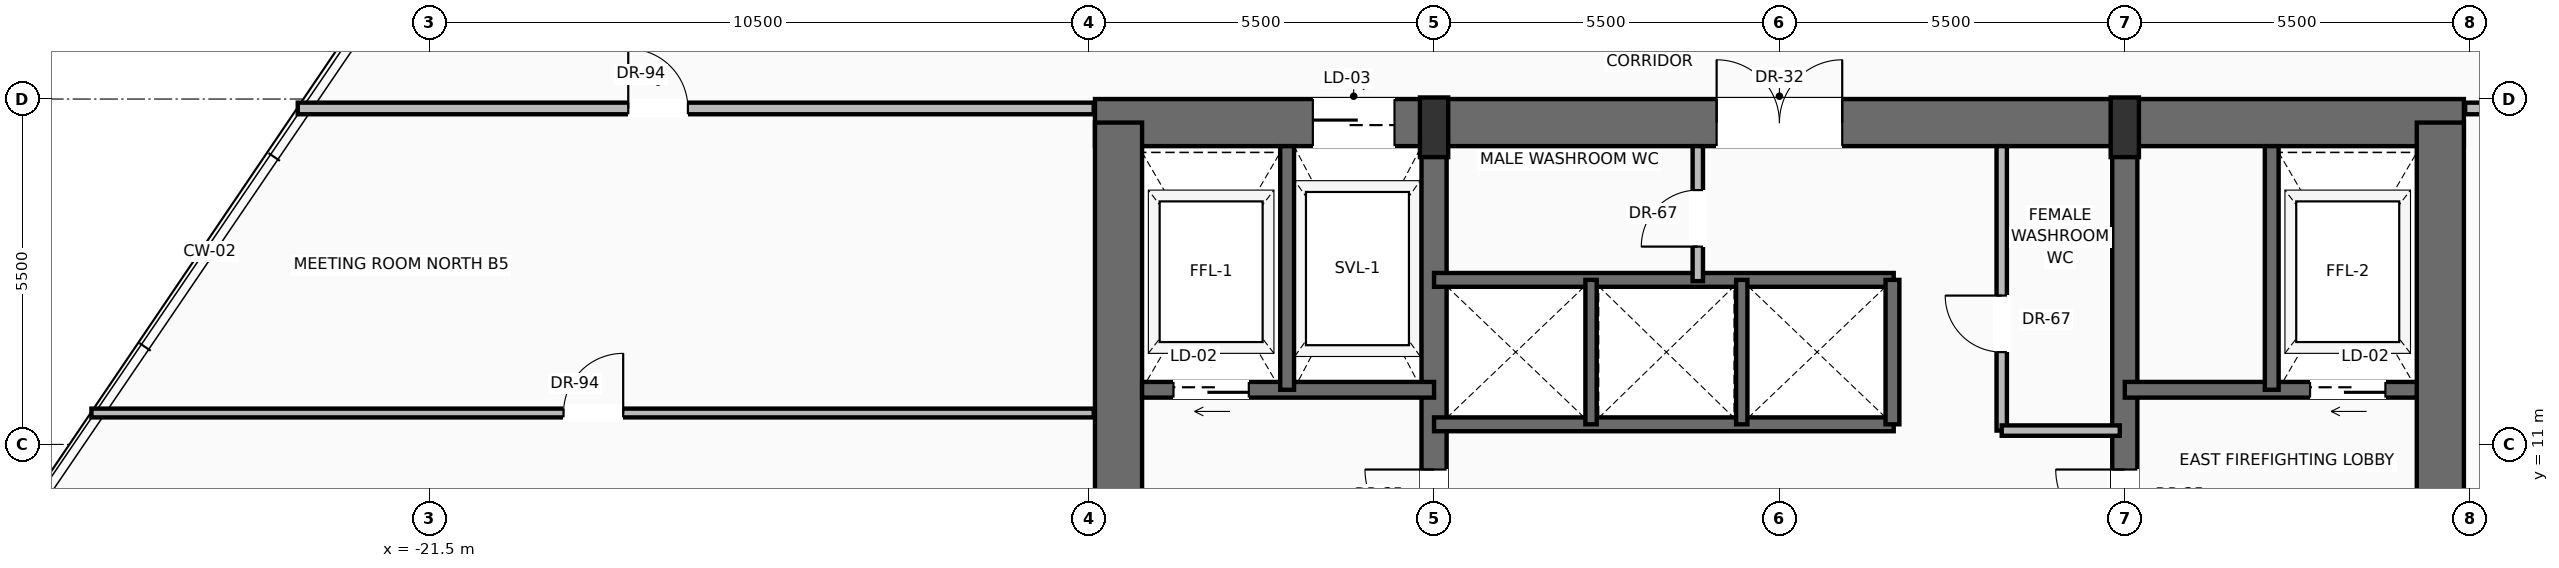
"""IFC4 building model, lengths in metres.
Left out: names, types, materials, properties, quantities, classifications, styles, units other than length and angle.
Written with IfcOpenShell. Run it as: python <this file> out.ifc"""

import sys

from ifc_helpers import new_model, si_unit, direction, frame, frame_2d, origin, origin_2d, place, context, subcontext, project, spatial, rectangle, extrude, source, transform, mapped, element, fill, save


model = new_model("IFC4")
c1 = context("Model", 3, precision=1e-05, world=origin(), true_north=direction((0.0, 1.0)))
c2 = subcontext(c1, "Body", "Model", "MODEL_VIEW")
j1 = project(units=[si_unit("LENGTHUNIT", "METRE"), si_unit("PLANEANGLEUNIT", "RADIAN")], contexts=[c1])
p1 = place(None, origin())
s1 = spatial("IfcSite", under=j1, at=p1, CompositionType="ELEMENT")
p2 = place(p1, origin())
s2 = spatial("IfcBuilding", under=s1, at=p2, CompositionType="ELEMENT")
p3 = place(p2, frame((0.0, 0.0, 76.6)))
s3 = spatial("IfcBuildingStorey", under=s2, at=p3, CompositionType="ELEMENT", Elevation=76.6)
p4 = place(p3, frame((-10.9, 16.125, 0.0), z_axis=(0.0, 0.0, 1.0), x_axis=(1.0, 0.0, 0.0)))
e1 = element("IfcWall", 1, at=p4, inside=s3, PredefinedType="SHEAR", context=c2, shape_type="SweptSolid", body=[
    extrude(rectangle(XDim=21.8, YDim=0.75, at=frame_2d((10.9, 0.0))), origin(), (0.0, 0.0, 1.0), 3.45),
])
p5 = place(p4, frame((3.47, 0.0, 0.0)))
e2 = element("IfcOpeningElement", 2, at=p5, cuts=e1, PredefinedType="OPENING", context=c2, shape_type="SweptSolid", body=[
    extrude(rectangle(XDim=1.3, YDim=2.3, at=frame_2d((0.65, 1.15))), frame((0.0, 0.385, 0.0), z_axis=(0.0, -1.0, 0.0), x_axis=(1.0, 0.0, 0.0)), (0.0, 0.0, 1.0), 0.77),
])
p6 = place(p4, frame((9.9, 0.0, 0.0)))
e3 = element("IfcOpeningElement", 3, at=p6, cuts=e1, PredefinedType="OPENING", context=c2, shape_type="SweptSolid", body=[
    extrude(rectangle(XDim=2.0, YDim=2.4, at=frame_2d((1.0, 1.2))), frame((0.0, 0.385, 0.0), z_axis=(0.0, -1.0, 0.0), x_axis=(1.0, 0.0, 0.0)), (0.0, 0.0, 1.0), 0.77),
])
for number, where, z_axis, x_axis in (
    (4, (-10.525, 0.475, 0.0), (0.0, 0.0, 1.0), (0.0, 1.0, 0.0)),
    (5, (10.525, 0.475, 0.0), (0.0, 0.0, 1.0), (0.0, 1.0, 0.0)),
):
    element("IfcWall", number, at=place(p3, frame(where, z_axis=z_axis, x_axis=x_axis)), inside=s3, PredefinedType="SHEAR", context=c2, shape_type="SweptSolid", body=[
        extrude(rectangle(XDim=15.65, YDim=0.75, at=frame_2d((7.825, 0.0))), origin(), (0.0, 0.0, 1.0), 3.45),
    ])
p7 = place(p3, frame((-5.5, 0.475, 0.0), z_axis=(0.0, 0.0, 1.0), x_axis=(0.0, 1.0, 0.0)))
e6 = element("IfcWall", 6, at=p7, inside=s3, PredefinedType="SHEAR", context=c2, shape_type="SweptSolid", body=[
    extrude(rectangle(XDim=15.65, YDim=0.4, at=frame_2d((7.825, 0.0))), origin(), (0.0, 0.0, 1.0), 3.45),
])
p8 = place(p7, frame((9.025, 0.0, 0.0)))
e7 = element("IfcOpeningElement", 7, at=p8, cuts=e6, PredefinedType="OPENING", context=c2, shape_type="SweptSolid", body=[
    extrude(rectangle(XDim=1.1, YDim=2.2, at=frame_2d((0.55, 1.1))), frame((0.0, 0.21, 0.0), z_axis=(0.0, -1.0, 0.0), x_axis=(1.0, 0.0, 0.0)), (0.0, 0.0, 1.0), 0.42),
])
p9 = place(p3, frame((5.5, 0.475, 0.0), z_axis=(0.0, 0.0, 1.0), x_axis=(0.0, 1.0, 0.0)))
e8 = element("IfcWall", 8, at=p9, inside=s3, PredefinedType="SHEAR", context=c2, shape_type="SweptSolid", body=[
    extrude(rectangle(XDim=15.65, YDim=0.4, at=frame_2d((7.825, 0.0))), origin(), (0.0, 0.0, 1.0), 3.45),
])
p10 = place(p9, frame((9.025, 0.0, 0.0)))
e9 = element("IfcOpeningElement", 9, at=p10, cuts=e8, PredefinedType="OPENING", context=c2, shape_type="SweptSolid", body=[
    extrude(rectangle(XDim=1.1, YDim=2.2, at=frame_2d((0.55, 1.1))), frame((0.0, 0.21, 0.0), z_axis=(0.0, -1.0, 0.0), x_axis=(1.0, 0.0, 0.0)), (0.0, 0.0, 1.0), 0.42),
])
m1 = source(origin(), c2, "Body", "SweptSolid", [
    extrude(rectangle(XDim=0.45, YDim=0.95, at=origin_2d()), origin(), (0.0, 0.0, 1.0), 3.7),
])
for number, where, z_axis, x_axis in (
    (10, (-5.5, 16.05, 0.0), (0.0, 0.0, 1.0), (1.0, 0.0, 0.0)),
    (11, (5.5, 16.05, 0.0), (0.0, 0.0, 1.0), (1.0, 0.0, 0.0)),
):
    element("IfcColumn", number, at=place(p3, frame(where, z_axis=z_axis, x_axis=x_axis)), inside=s3, PredefinedType="PILASTER", context=c2, shape_type="MappedRepresentation", body=[
        mapped(m1, transform((0.0, 0.0, 0.0), scale=1.0)),
    ])
p11 = place(p3, frame((-5.5, 11.87, 0.0), z_axis=(0.0, 0.0, 1.0), x_axis=(-1.0, 0.0, 0.0)))
e12 = element("IfcWall", 12, at=p11, inside=s3, PredefinedType="SOLIDWALL", context=c2, shape_type="SweptSolid", body=[
    extrude(rectangle(XDim=4.65, YDim=0.25, at=frame_2d((2.325, 0.0))), origin(), (0.0, 0.0, 1.0), 3.45),
])
p12 = place(p11, frame((2.95, 0.0, 0.0)))
e13 = element("IfcOpeningElement", 13, at=p12, cuts=e12, PredefinedType="OPENING", context=c2, shape_type="SweptSolid", body=[
    extrude(rectangle(XDim=1.2, YDim=2.25, at=frame_2d((0.6, 1.125))), frame((0.0, 0.135, 0.0), z_axis=(0.0, -1.0, 0.0), x_axis=(1.0, 0.0, 0.0)), (0.0, 0.0, 1.0), 0.27),
])
p13 = place(p3, frame((-7.84, 11.87, 0.0), z_axis=(0.0, 0.0, 1.0), x_axis=(0.0, 1.0, 0.0)))
e14 = element("IfcWall", 14, at=p13, inside=s3, PredefinedType="SOLIDWALL", context=c2, shape_type="SweptSolid", body=[
    extrude(rectangle(XDim=3.88, YDim=0.22, at=frame_2d((1.94, 0.0))), origin(), (0.0, 0.0, 1.0), 3.45),
])
p14 = place(p3, frame((10.15, 11.87, 0.0), z_axis=(0.0, 0.0, 1.0), x_axis=(-1.0, 0.0, 0.0)))
e15 = element("IfcWall", 15, at=p14, inside=s3, PredefinedType="SOLIDWALL", context=c2, shape_type="SweptSolid", body=[
    extrude(rectangle(XDim=4.65, YDim=0.25, at=frame_2d((2.325, 0.0))), origin(), (0.0, 0.0, 1.0), 3.45),
])
p15 = place(p14, frame((0.5, 0.0, 0.0)))
e16 = element("IfcOpeningElement", 16, at=p15, cuts=e15, PredefinedType="OPENING", context=c2, shape_type="SweptSolid", body=[
    extrude(rectangle(XDim=1.2, YDim=2.25, at=frame_2d((0.6, 1.125))), frame((0.0, 0.135, 0.0), z_axis=(0.0, -1.0, 0.0), x_axis=(1.0, 0.0, 0.0)), (0.0, 0.0, 1.0), 0.27),
])
p16 = place(p3, frame((7.84, 11.87, 0.0), z_axis=(0.0, 0.0, 1.0), x_axis=(0.0, 1.0, 0.0)))
e17 = element("IfcWall", 17, at=p16, inside=s3, PredefinedType="SOLIDWALL", context=c2, shape_type="SweptSolid", body=[
    extrude(rectangle(XDim=3.88, YDim=0.22, at=frame_2d((1.94, 0.0))), origin(), (0.0, 0.0, 1.0), 3.45),
])
for number, where, z_axis, x_axis in (
    (18, (-5.5, 11.32, 0.0), (0.0, 0.0, 1.0), (1.0, 0.0, 0.0)),
    (19, (-5.5, 13.62, 0.0), (0.0, 0.0, 1.0), (1.0, 0.0, 0.0)),
):
    element("IfcWall", number, at=place(p3, frame(where, z_axis=z_axis, x_axis=x_axis)), inside=s3, PredefinedType="SOLIDWALL", context=c2, shape_type="SweptSolid", body=[
        extrude(rectangle(XDim=7.32, YDim=0.22, at=frame_2d((3.66, 0.0))), origin(), (0.0, 0.0, 1.0), 3.45),
    ])
p17 = place(p3, frame((1.8, 11.32, 0.0), z_axis=(0.0, 0.0, 1.0), x_axis=(0.0, 1.0, 0.0)))
e20 = element("IfcWall", 20, at=p17, inside=s3, PredefinedType="SOLIDWALL", context=c2, shape_type="SweptSolid", body=[
    extrude(rectangle(XDim=2.3, YDim=0.22, at=frame_2d((1.15, 0.0))), origin(), (0.0, 0.0, 1.0), 3.45),
])
for number, where, z_axis, x_axis in (
    (21, (-3.0, 11.32, 0.0), (0.0, 0.0, 1.0), (0.0, 1.0, 0.0)),
    (22, (-0.6, 11.32, 0.0), (0.0, 0.0, 1.0), (0.0, 1.0, 0.0)),
):
    element("IfcWall", number, at=place(p3, frame(where, z_axis=z_axis, x_axis=x_axis)), inside=s3, PredefinedType="SOLIDWALL", context=c2, shape_type="SweptSolid", body=[
        extrude(rectangle(XDim=2.3, YDim=0.18, at=frame_2d((1.15, 0.0))), origin(), (0.0, 0.0, 1.0), 3.45),
    ])
p18 = place(p3, frame((-1.3, 13.6, 0.0), z_axis=(0.0, 0.0, 1.0), x_axis=(0.0, 1.0, 0.0)))
e23 = element("IfcWall", 23, at=p18, inside=s3, PredefinedType="PARTITIONING", context=c2, shape_type="SweptSolid", body=[
    extrude(rectangle(XDim=2.15, YDim=0.165, at=frame_2d((1.075, 0.0))), origin(), (0.0, 0.0, 1.0), 3.442),
])
p19 = place(p18, frame((0.55, 0.0, 0.0)))
e24 = element("IfcOpeningElement", 24, at=p19, cuts=e23, PredefinedType="OPENING", context=c2, shape_type="SweptSolid", body=[
    extrude(rectangle(XDim=0.9, YDim=2.1, at=frame_2d((0.45, 1.05))), frame((0.0, 0.093, 0.0), z_axis=(0.0, -1.0, 0.0), x_axis=(1.0, 0.0, 0.0)), (0.0, 0.0, 1.0), 0.185),
])
p20 = place(p3, frame((3.54, 11.22, 0.0), z_axis=(0.0, 0.0, 1.0), x_axis=(0.0, 1.0, 0.0)))
e25 = element("IfcWall", 25, at=p20, inside=s3, PredefinedType="PARTITIONING", context=c2, shape_type="SweptSolid", body=[
    extrude(rectangle(XDim=4.53, YDim=0.165, at=frame_2d((2.265, 0.0))), origin(), (0.0, 0.0, 1.0), 3.442),
])
p21 = place(p20, frame((1.25, 0.0, 0.0)))
e26 = element("IfcOpeningElement", 26, at=p21, cuts=e25, PredefinedType="OPENING", context=c2, shape_type="SweptSolid", body=[
    extrude(rectangle(XDim=0.9, YDim=2.1, at=frame_2d((0.45, 1.05))), frame((0.0, 0.093, 0.0), z_axis=(0.0, -1.0, 0.0), x_axis=(1.0, 0.0, 0.0)), (0.0, 0.0, 1.0), 0.185),
])
p22 = place(p3, frame((3.54, 11.22, 0.0), z_axis=(0.0, 0.0, 1.0), x_axis=(1.0, 0.0, 0.0)))
e27 = element("IfcWall", 27, at=p22, inside=s3, PredefinedType="PARTITIONING", context=c2, shape_type="SweptSolid", body=[
    extrude(rectangle(XDim=1.88, YDim=0.165, at=frame_2d((0.94, 0.0))), origin(), (0.0, 0.0, 1.0), 3.442),
])
p23 = place(p3, frame((-23.596, 16.35, 0.0), z_axis=(0.0, 0.0, 1.0), x_axis=(1.0, 0.0, 0.0)))
e28 = element("IfcWall", 28, at=p23, inside=s3, PredefinedType="PARTITIONING", context=c2, shape_type="SweptSolid", body=[
    extrude(rectangle(XDim=12.676, YDim=0.185, at=frame_2d((6.338, 0.0))), origin(), (0.0, 0.0, 1.0), 2.747),
])
p24 = place(p23, frame((5.263, 0.0, 0.0)))
e29 = element("IfcOpeningElement", 29, at=p24, cuts=e28, PredefinedType="OPENING", context=c2, shape_type="SweptSolid", body=[
    extrude(rectangle(XDim=0.95, YDim=2.2, at=frame_2d((0.475, 1.1))), frame((0.0, 0.103, 0.0), z_axis=(0.0, -1.0, 0.0), x_axis=(1.0, 0.0, 0.0)), (0.0, 0.0, 1.0), 0.205),
])
p25 = place(p3, frame((10.92, 16.35, 0.0), z_axis=(0.0, 0.0, 1.0), x_axis=(1.0, 0.0, 0.0)))
e30 = element("IfcWall", 30, at=p25, inside=s3, PredefinedType="PARTITIONING", context=c2, shape_type="SweptSolid", body=[
    extrude(rectangle(XDim=13.045, YDim=0.185, at=frame_2d((6.522, 0.0))), origin(), (0.0, 0.0, 1.0), 2.747),
])
p26 = place(p25, frame((6.666, 0.0, 0.0)))
e31 = element("IfcOpeningElement", 31, at=p26, cuts=e30, PredefinedType="OPENING", context=c2, shape_type="SweptSolid", body=[
    extrude(rectangle(XDim=0.95, YDim=2.2, at=frame_2d((0.475, 1.1))), frame((0.0, 0.103, 0.0), z_axis=(0.0, -1.0, 0.0), x_axis=(1.0, 0.0, 0.0)), (0.0, 0.0, 1.0), 0.205),
])
p27 = place(p3, frame((-26.881, 11.5, 0.0), z_axis=(0.0, 0.0, 1.0), x_axis=(1.0, 0.0, 0.0)))
e32 = element("IfcWall", 32, at=p27, inside=s3, PredefinedType="PARTITIONING", context=c2, shape_type="SweptSolid", body=[
    extrude(rectangle(XDim=15.961, YDim=0.14, at=frame_2d((7.981, 0.0))), origin(), (0.0, 0.0, 1.0), 3.442),
])
p28 = place(p27, frame((7.518, 0.0, 0.0)))
e33 = element("IfcOpeningElement", 33, at=p28, cuts=e32, PredefinedType="OPENING", context=c2, shape_type="SweptSolid", body=[
    extrude(rectangle(XDim=0.95, YDim=2.2, at=frame_2d((0.475, 1.1))), frame((0.0, 0.08, 0.0), z_axis=(0.0, -1.0, 0.0), x_axis=(1.0, 0.0, 0.0)), (0.0, 0.0, 1.0), 0.16),
])
m2 = source(origin(), c2, "Body", "SweptSolid", [
    extrude(rectangle(XDim=1.1, YDim=2.2, at=frame_2d((0.55, 1.1))), frame((0.0, 0.025, 0.0), z_axis=(0.0, -1.0, 0.0), x_axis=(1.0, 0.0, 0.0)), (0.0, 0.0, 1.0), 0.05),
])
p29 = place(p8, origin())
e34 = element("IfcDoor", 34, at=p29, inside=s3, OperationType="SINGLE_SWING_RIGHT", PredefinedType="DOOR", context=c2, shape_type="MappedRepresentation", body=[
    mapped(m2, transform((0.0, 0.0, 0.0), scale=1.0)),
])
fill(e7, e34)
m3 = source(origin(), c2, "Body", "SweptSolid", [
    extrude(rectangle(XDim=1.2, YDim=2.25, at=frame_2d((0.6, 1.125))), frame((0.0, 0.025, 0.0), z_axis=(0.0, -1.0, 0.0), x_axis=(1.0, 0.0, 0.0)), (0.0, 0.0, 1.0), 0.05),
])
p30 = place(p12, origin())
e35 = element("IfcDoor", 35, at=p30, inside=s3, OperationType="SLIDING_TO_LEFT", PredefinedType="DOOR", context=c2, shape_type="MappedRepresentation", body=[
    mapped(m3, transform((0.0, 0.0, 0.0), scale=1.0)),
])
fill(e13, e35)
m4 = source(origin(), c2, "Body", "SweptSolid", [
    extrude(rectangle(XDim=1.3, YDim=2.3, at=frame_2d((0.65, 1.15))), frame((0.0, 0.025, 0.0), z_axis=(0.0, -1.0, 0.0), x_axis=(1.0, 0.0, 0.0)), (0.0, 0.0, 1.0), 0.05),
])
p31 = place(p5, origin())
e36 = element("IfcDoor", 36, at=p31, inside=s3, OperationType="SLIDING_TO_RIGHT", PredefinedType="DOOR", context=c2, shape_type="MappedRepresentation", body=[
    mapped(m4, transform((0.0, 0.0, 0.0), scale=1.0)),
])
fill(e2, e36)
p32 = place(p10, origin())
e37 = element("IfcDoor", 37, at=p32, inside=s3, OperationType="SINGLE_SWING_RIGHT", PredefinedType="DOOR", context=c2, shape_type="MappedRepresentation", body=[
    mapped(m2, transform((0.0, 0.0, 0.0), scale=1.0)),
])
fill(e9, e37)
p33 = place(p15, origin())
e38 = element("IfcDoor", 38, at=p33, inside=s3, OperationType="SLIDING_TO_RIGHT", PredefinedType="DOOR", context=c2, shape_type="MappedRepresentation", body=[
    mapped(m3, transform((0.0, 0.0, 0.0), scale=1.0)),
])
fill(e16, e38)
m5 = source(origin(), c2, "Body", "SweptSolid", [
    extrude(rectangle(XDim=2.0, YDim=2.4, at=frame_2d((1.0, 1.2))), frame((0.0, 0.025, 0.0), z_axis=(0.0, -1.0, 0.0), x_axis=(1.0, 0.0, 0.0)), (0.0, 0.0, 1.0), 0.05),
])
p34 = place(p6, origin())
e39 = element("IfcDoor", 39, at=p34, inside=s3, OperationType="DOUBLE_DOOR_SINGLE_SWING", PredefinedType="DOOR", context=c2, shape_type="MappedRepresentation", body=[
    mapped(m5, transform((0.0, 0.0, 0.0), scale=1.0)),
])
fill(e3, e39)
m6 = source(origin(), c2, "Body", "SweptSolid", [
    extrude(rectangle(XDim=0.9, YDim=2.1, at=frame_2d((0.45, 1.05))), frame((0.0, 0.025, 0.0), z_axis=(0.0, -1.0, 0.0), x_axis=(1.0, 0.0, 0.0)), (0.0, 0.0, 1.0), 0.05),
])
p35 = place(p19, origin())
e40 = element("IfcDoor", 40, at=p35, inside=s3, OperationType="SINGLE_SWING_LEFT", PredefinedType="DOOR", context=c2, shape_type="MappedRepresentation", body=[
    mapped(m6, transform((0.0, 0.0, 0.0), scale=1.0)),
])
fill(e24, e40)
p36 = place(p21, origin())
e41 = element("IfcDoor", 41, at=p36, inside=s3, OperationType="SINGLE_SWING_RIGHT", PredefinedType="DOOR", context=c2, shape_type="MappedRepresentation", body=[
    mapped(m6, transform((0.0, 0.0, 0.0), scale=1.0)),
])
fill(e26, e41)
m7 = source(origin(), c2, "Body", "SweptSolid", [
    extrude(rectangle(XDim=0.95, YDim=2.2, at=frame_2d((0.475, 1.1))), frame((0.0, 0.025, 0.0), z_axis=(0.0, -1.0, 0.0), x_axis=(1.0, 0.0, 0.0)), (0.0, 0.0, 1.0), 0.05),
])
p37 = place(p24, origin())
e42 = element("IfcDoor", 42, at=p37, inside=s3, OperationType="SINGLE_SWING_LEFT", PredefinedType="DOOR", context=c2, shape_type="MappedRepresentation", body=[
    mapped(m7, transform((0.0, 0.0, 0.0), scale=1.0)),
])
fill(e29, e42)
p38 = place(p28, origin())
e43 = element("IfcDoor", 43, at=p38, inside=s3, OperationType="SINGLE_SWING_RIGHT", PredefinedType="DOOR", context=c2, shape_type="MappedRepresentation", body=[
    mapped(m7, transform((0.0, 0.0, 0.0), scale=1.0)),
])
fill(e33, e43)
save(model, sys.argv[1])
